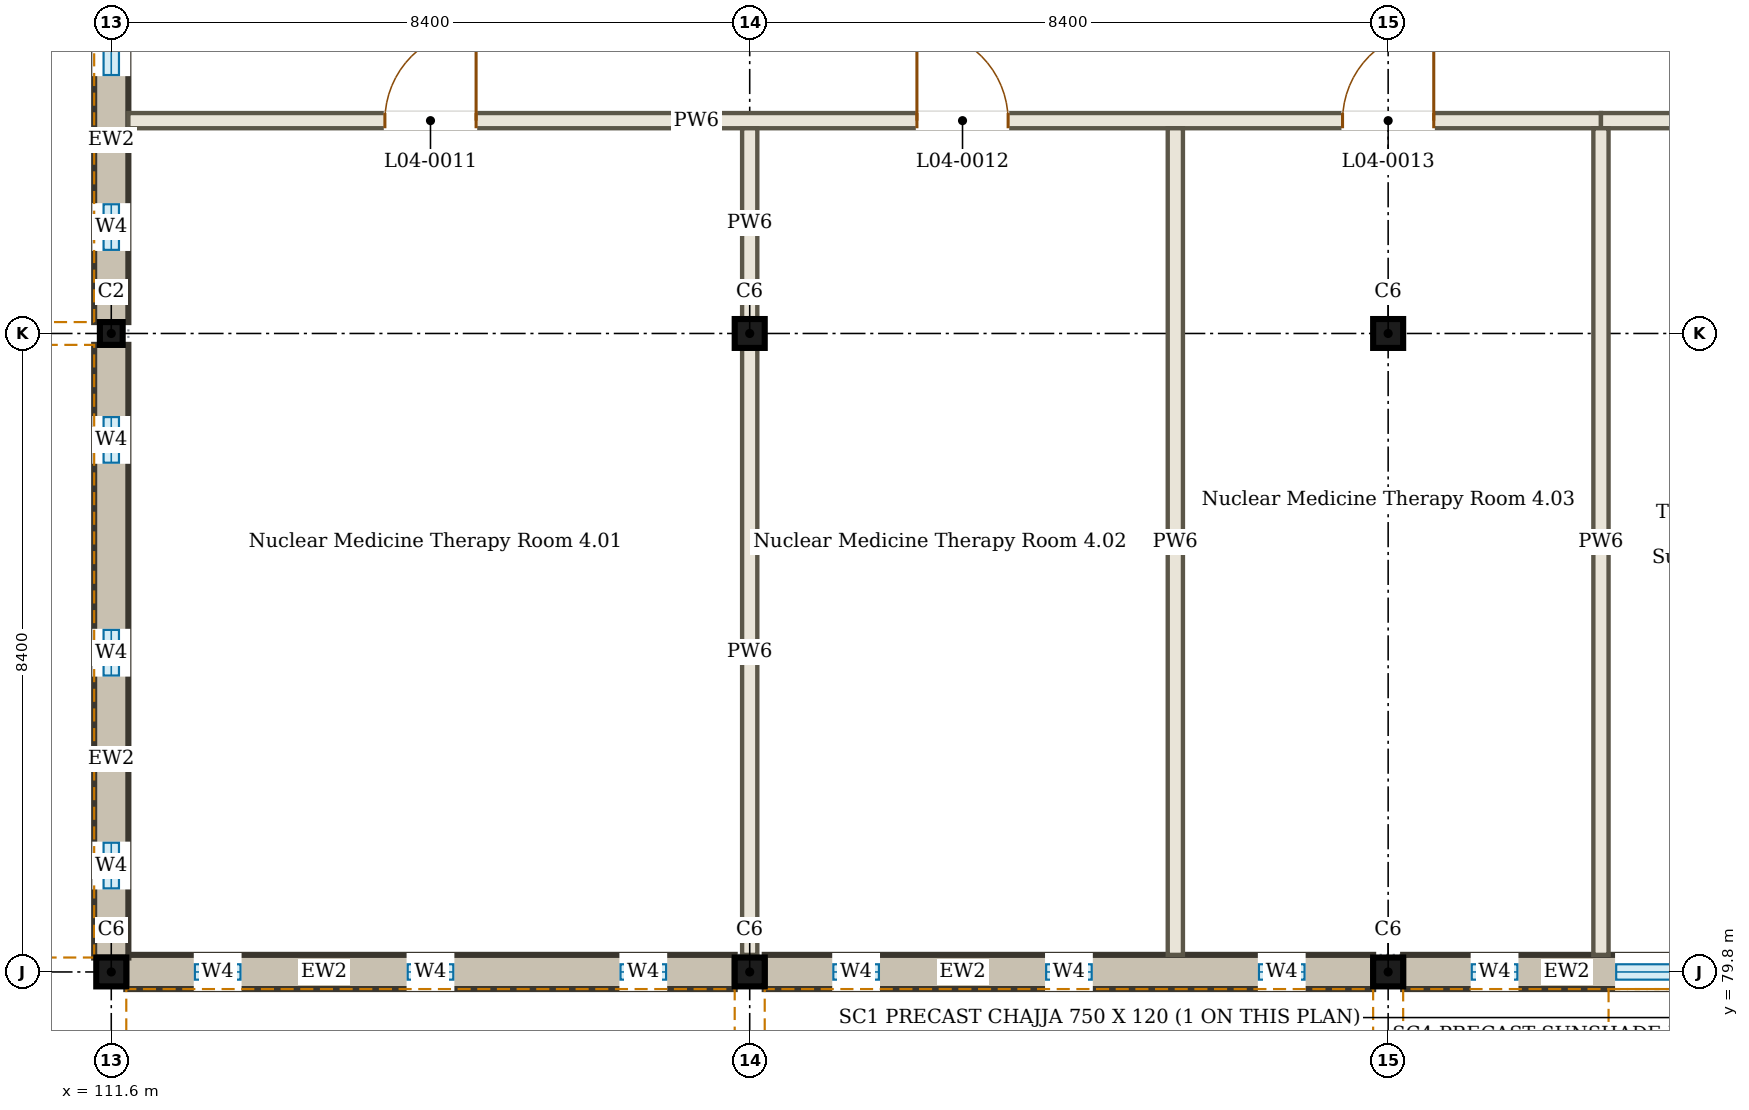
"""IFC4 building model, lengths in metres.
Left out: names, types, materials, properties, quantities, classifications, styles, units other than length and angle.
Written with IfcOpenShell. Run it as: python <this file> out.ifc"""

import sys

from ifc_helpers import new_model, si_unit, direction, frame, frame_2d, origin, origin_2d, place, context, subcontext, project, spatial, rectangle, i_section, extrude, element, fill, save


model = new_model("IFC4")
c1 = context("Model", 3, precision=1e-05, world=origin(), true_north=direction((0.0, 1.0)))
c2 = subcontext(c1, "Body", "Model", "MODEL_VIEW")
j1 = project(units=[si_unit("LENGTHUNIT", "METRE"), si_unit("PLANEANGLEUNIT", "RADIAN")], contexts=[c1])
p1 = place(None, origin())
s1 = spatial("IfcSite", under=j1, at=p1, CompositionType="ELEMENT")
p2 = place(p1, origin())
s2 = spatial("IfcBuilding", under=s1, at=p2, CompositionType="ELEMENT")
p3 = place(p2, frame((0.0, 0.0, 18.0)))
s3 = spatial("IfcBuildingStorey", under=s2, at=p3, CompositionType="ELEMENT", Elevation=18.0)
for number, where, z_axis, x_axis in (
    (1, (111.6, 79.8, 0.0), (0.0, 0.0, 1.0), (1.0, 0.0, 0.0)),
    (2, (120.0, 79.8, 0.0), (0.0, 0.0, 1.0), (1.0, 0.0, 0.0)),
    (3, (128.4, 79.8, 0.0), (0.0, 0.0, 1.0), (1.0, 0.0, 0.0)),
):
    element("IfcColumn", number, at=place(p3, frame(where, z_axis=z_axis, x_axis=x_axis)), inside=s3, PredefinedType="COLUMN", context=c2, shape_type="SweptSolid", body=[
        extrude(i_section(OverallWidth=0.395, OverallDepth=0.38, WebThickness=0.019, FlangeThickness=0.03, FilletRadius=0.027, at=origin_2d()), origin(), (0.0, 0.0, 1.0), 4.5),
    ])
p4 = place(p3, frame((111.6, 88.2, 0.0), z_axis=(0.0, 0.0, 1.0), x_axis=(1.0, 0.0, 0.0)))
e4 = element("IfcColumn", 4, at=p4, inside=s3, PredefinedType="COLUMN", context=c2, shape_type="SweptSolid", body=[
    extrude(i_section(OverallWidth=0.3, OverallDepth=0.3, WebThickness=0.011, FlangeThickness=0.019, FilletRadius=0.027, at=origin_2d()), origin(), (0.0, 0.0, 1.0), 4.5),
])
for number, where, z_axis, x_axis in (
    (5, (120.0, 88.2, 0.0), (0.0, 0.0, 1.0), (1.0, 0.0, 0.0)),
    (6, (128.4, 88.2, 0.0), (0.0, 0.0, 1.0), (1.0, 0.0, 0.0)),
):
    element("IfcColumn", number, at=place(p3, frame(where, z_axis=z_axis, x_axis=x_axis)), inside=s3, PredefinedType="COLUMN", context=c2, shape_type="SweptSolid", body=[
        extrude(i_section(OverallWidth=0.395, OverallDepth=0.38, WebThickness=0.019, FlangeThickness=0.03, FilletRadius=0.027, at=origin_2d()), origin(), (0.0, 0.0, 1.0), 4.5),
    ])
p5 = place(p3, frame((111.798, 79.8, 0.0), z_axis=(0.0, 0.0, 1.0), x_axis=(1.0, 0.0, 0.0)))
e7 = element("IfcWall", 7, at=p5, inside=s3, PredefinedType="SOLIDWALL", context=c2, shape_type="SweptSolid", body=[
    extrude(rectangle(XDim=8.005, YDim=0.45, at=frame_2d((4.002, 0.0))), origin(), (0.0, 0.0, 1.0), 3.8),
])
p6 = place(p5, frame((0.903, 0.0, 2.1)))
e8 = element("IfcOpeningElement", 8, at=p6, cuts=e7, PredefinedType="OPENING", context=c2, shape_type="SweptSolid", body=[
    extrude(rectangle(XDim=0.6, YDim=1.2, at=frame_2d((0.3, 0.6))), frame((0.0, 0.235, 0.0), z_axis=(0.0, -1.0, 0.0), x_axis=(1.0, 0.0, 0.0)), (0.0, 0.0, 1.0), 0.47),
])
p7 = place(p5, frame((3.702, 0.0, 2.1)))
e9 = element("IfcOpeningElement", 9, at=p7, cuts=e7, PredefinedType="OPENING", context=c2, shape_type="SweptSolid", body=[
    extrude(rectangle(XDim=0.6, YDim=1.2, at=frame_2d((0.3, 0.6))), frame((0.0, 0.235, 0.0), z_axis=(0.0, -1.0, 0.0), x_axis=(1.0, 0.0, 0.0)), (0.0, 0.0, 1.0), 0.47),
])
p8 = place(p5, frame((6.502, 0.0, 2.1)))
e10 = element("IfcOpeningElement", 10, at=p8, cuts=e7, PredefinedType="OPENING", context=c2, shape_type="SweptSolid", body=[
    extrude(rectangle(XDim=0.6, YDim=1.2, at=frame_2d((0.3, 0.6))), frame((0.0, 0.235, 0.0), z_axis=(0.0, -1.0, 0.0), x_axis=(1.0, 0.0, 0.0)), (0.0, 0.0, 1.0), 0.47),
])
p9 = place(p3, frame((111.798, 79.64, 3.82), z_axis=(0.0, 0.0, 1.0), x_axis=(1.0, 0.0, 0.0)))
e11 = element("IfcWall", 11, at=p9, inside=s3, PredefinedType="SOLIDWALL", context=c2, shape_type="SweptSolid", body=[
    extrude(rectangle(XDim=8.005, YDim=0.13, at=frame_2d((4.002, 0.0))), origin(), (0.0, 0.0, 1.0), 0.68),
])
p10 = place(p3, frame((120.198, 79.8, 0.0), z_axis=(0.0, 0.0, 1.0), x_axis=(1.0, 0.0, 0.0)))
e12 = element("IfcWall", 12, at=p10, inside=s3, PredefinedType="SOLIDWALL", context=c2, shape_type="SweptSolid", body=[
    extrude(rectangle(XDim=8.005, YDim=0.45, at=frame_2d((4.002, 0.0))), origin(), (0.0, 0.0, 1.0), 3.8),
])
p11 = place(p10, frame((0.903, 0.0, 2.1)))
e13 = element("IfcOpeningElement", 13, at=p11, cuts=e12, PredefinedType="OPENING", context=c2, shape_type="SweptSolid", body=[
    extrude(rectangle(XDim=0.6, YDim=1.2, at=frame_2d((0.3, 0.6))), frame((0.0, 0.235, 0.0), z_axis=(0.0, -1.0, 0.0), x_axis=(1.0, 0.0, 0.0)), (0.0, 0.0, 1.0), 0.47),
])
p12 = place(p10, frame((3.702, 0.0, 2.1)))
e14 = element("IfcOpeningElement", 14, at=p12, cuts=e12, PredefinedType="OPENING", context=c2, shape_type="SweptSolid", body=[
    extrude(rectangle(XDim=0.6, YDim=1.2, at=frame_2d((0.3, 0.6))), frame((0.0, 0.235, 0.0), z_axis=(0.0, -1.0, 0.0), x_axis=(1.0, 0.0, 0.0)), (0.0, 0.0, 1.0), 0.47),
])
p13 = place(p10, frame((6.502, 0.0, 2.1)))
e15 = element("IfcOpeningElement", 15, at=p13, cuts=e12, PredefinedType="OPENING", context=c2, shape_type="SweptSolid", body=[
    extrude(rectangle(XDim=0.6, YDim=1.2, at=frame_2d((0.3, 0.6))), frame((0.0, 0.235, 0.0), z_axis=(0.0, -1.0, 0.0), x_axis=(1.0, 0.0, 0.0)), (0.0, 0.0, 1.0), 0.47),
])
p14 = place(p3, frame((120.198, 79.64, 3.82), z_axis=(0.0, 0.0, 1.0), x_axis=(1.0, 0.0, 0.0)))
e16 = element("IfcWall", 16, at=p14, inside=s3, PredefinedType="SOLIDWALL", context=c2, shape_type="SweptSolid", body=[
    extrude(rectangle(XDim=8.005, YDim=0.13, at=frame_2d((4.002, 0.0))), origin(), (0.0, 0.0, 1.0), 0.68),
])
p15 = place(p3, frame((128.597, 79.8, 0.0), z_axis=(0.0, 0.0, 1.0), x_axis=(1.0, 0.0, 0.0)))
e17 = element("IfcWall", 17, at=p15, inside=s3, PredefinedType="SOLIDWALL", context=c2, shape_type="SweptSolid", body=[
    extrude(rectangle(XDim=8.203, YDim=0.45, at=frame_2d((4.101, 0.0))), origin(), (0.0, 0.0, 1.0), 3.8),
])
p16 = place(p15, frame((0.903, 0.0, 2.1)))
e18 = element("IfcOpeningElement", 18, at=p16, cuts=e17, PredefinedType="OPENING", context=c2, shape_type="SweptSolid", body=[
    extrude(rectangle(XDim=0.6, YDim=1.2, at=frame_2d((0.3, 0.6))), frame((0.0, 0.235, 0.0), z_axis=(0.0, -1.0, 0.0), x_axis=(1.0, 0.0, 0.0)), (0.0, 0.0, 1.0), 0.47),
])
p17 = place(p15, frame((2.802, 0.0, 0.9)))
e19 = element("IfcOpeningElement", 19, at=p17, cuts=e17, PredefinedType="OPENING", context=c2, shape_type="SweptSolid", body=[
    extrude(rectangle(XDim=2.4, YDim=1.2, at=frame_2d((1.2, 0.6))), frame((0.0, 0.235, 0.0), z_axis=(0.0, -1.0, 0.0), x_axis=(1.0, 0.0, 0.0)), (0.0, 0.0, 1.0), 0.47),
])
p18 = place(p15, frame((6.502, 0.0, 2.1)))
e20 = element("IfcOpeningElement", 20, at=p18, cuts=e17, PredefinedType="OPENING", context=c2, shape_type="SweptSolid", body=[
    extrude(rectangle(XDim=0.6, YDim=1.2, at=frame_2d((0.3, 0.6))), frame((0.0, 0.235, 0.0), z_axis=(0.0, -1.0, 0.0), x_axis=(1.0, 0.0, 0.0)), (0.0, 0.0, 1.0), 0.47),
])
p19 = place(p3, frame((128.597, 79.64, 3.82), z_axis=(0.0, 0.0, 1.0), x_axis=(1.0, 0.0, 0.0)))
e21 = element("IfcWall", 21, at=p19, inside=s3, PredefinedType="SOLIDWALL", context=c2, shape_type="SweptSolid", body=[
    extrude(rectangle(XDim=8.203, YDim=0.13, at=frame_2d((4.101, 0.0))), origin(), (0.0, 0.0, 1.0), 0.68),
])
p20 = place(p3, frame((111.6, 79.99, 0.0), z_axis=(0.0, 0.0, 1.0), x_axis=(0.0, 1.0, 0.0)))
e22 = element("IfcWall", 22, at=p20, inside=s3, PredefinedType="SOLIDWALL", context=c2, shape_type="SweptSolid", body=[
    extrude(rectangle(XDim=8.06, YDim=0.45, at=frame_2d((4.03, 0.0))), origin(), (0.0, 0.0, 1.0), 3.8),
])
p21 = place(p20, frame((0.91, 0.0, 2.1)))
e23 = element("IfcOpeningElement", 23, at=p21, cuts=e22, PredefinedType="OPENING", context=c2, shape_type="SweptSolid", body=[
    extrude(rectangle(XDim=0.6, YDim=1.2, at=frame_2d((0.3, 0.6))), frame((0.0, 0.235, 0.0), z_axis=(0.0, -1.0, 0.0), x_axis=(1.0, 0.0, 0.0)), (0.0, 0.0, 1.0), 0.47),
])
p22 = place(p20, frame((3.71, 0.0, 2.1)))
e24 = element("IfcOpeningElement", 24, at=p22, cuts=e22, PredefinedType="OPENING", context=c2, shape_type="SweptSolid", body=[
    extrude(rectangle(XDim=0.6, YDim=1.2, at=frame_2d((0.3, 0.6))), frame((0.0, 0.235, 0.0), z_axis=(0.0, -1.0, 0.0), x_axis=(1.0, 0.0, 0.0)), (0.0, 0.0, 1.0), 0.47),
])
p23 = place(p20, frame((6.51, 0.0, 2.1)))
e25 = element("IfcOpeningElement", 25, at=p23, cuts=e22, PredefinedType="OPENING", context=c2, shape_type="SweptSolid", body=[
    extrude(rectangle(XDim=0.6, YDim=1.2, at=frame_2d((0.3, 0.6))), frame((0.0, 0.235, 0.0), z_axis=(0.0, -1.0, 0.0), x_axis=(1.0, 0.0, 0.0)), (0.0, 0.0, 1.0), 0.47),
])
p24 = place(p3, frame((111.44, 79.99, 3.82), z_axis=(0.0, 0.0, 1.0), x_axis=(0.0, 1.0, 0.0)))
e26 = element("IfcWall", 26, at=p24, inside=s3, PredefinedType="SOLIDWALL", context=c2, shape_type="SweptSolid", body=[
    extrude(rectangle(XDim=8.06, YDim=0.13, at=frame_2d((4.03, 0.0))), origin(), (0.0, 0.0, 1.0), 0.68),
])
p25 = place(p3, frame((111.6, 88.35, 0.0), z_axis=(0.0, 0.0, 1.0), x_axis=(0.0, 1.0, 0.0)))
e27 = element("IfcWall", 27, at=p25, inside=s3, PredefinedType="SOLIDWALL", context=c2, shape_type="SweptSolid", body=[
    extrude(rectangle(XDim=8.25, YDim=0.45, at=frame_2d((4.125, 0.0))), origin(), (0.0, 0.0, 1.0), 3.8),
])
p26 = place(p25, frame((0.95, 0.0, 2.1)))
e28 = element("IfcOpeningElement", 28, at=p26, cuts=e27, PredefinedType="OPENING", context=c2, shape_type="SweptSolid", body=[
    extrude(rectangle(XDim=0.6, YDim=1.2, at=frame_2d((0.3, 0.6))), frame((0.0, 0.235, 0.0), z_axis=(0.0, -1.0, 0.0), x_axis=(1.0, 0.0, 0.0)), (0.0, 0.0, 1.0), 0.47),
])
p27 = place(p25, frame((3.25, 0.0, 2.7)))
e29 = element("IfcOpeningElement", 29, at=p27, cuts=e27, PredefinedType="OPENING", context=c2, shape_type="SweptSolid", body=[
    extrude(rectangle(XDim=1.6, YDim=0.6, at=frame_2d((0.8, 0.3))), frame((0.0, 0.235, 0.0), z_axis=(0.0, -1.0, 0.0), x_axis=(1.0, 0.0, 0.0)), (0.0, 0.0, 1.0), 0.47),
])
p28 = place(p25, frame((6.05, 0.0, 2.7)))
e30 = element("IfcOpeningElement", 30, at=p28, cuts=e27, PredefinedType="OPENING", context=c2, shape_type="SweptSolid", body=[
    extrude(rectangle(XDim=1.6, YDim=0.6, at=frame_2d((0.8, 0.3))), frame((0.0, 0.235, 0.0), z_axis=(0.0, -1.0, 0.0), x_axis=(1.0, 0.0, 0.0)), (0.0, 0.0, 1.0), 0.47),
])
p29 = place(p3, frame((111.44, 88.35, 3.82), z_axis=(0.0, 0.0, 1.0), x_axis=(0.0, 1.0, 0.0)))
e31 = element("IfcWall", 31, at=p29, inside=s3, PredefinedType="SOLIDWALL", context=c2, shape_type="SweptSolid", body=[
    extrude(rectangle(XDim=8.25, YDim=0.13, at=frame_2d((4.125, 0.0))), origin(), (0.0, 0.0, 1.0), 0.68),
])
p30 = place(p3, frame((111.825, 91.0, 0.0), z_axis=(0.0, 0.0, 1.0), x_axis=(1.0, 0.0, 0.0)))
e32 = element("IfcWall", 32, at=p30, inside=s3, PredefinedType="PARTITIONING", context=c2, shape_type="SweptSolid", body=[
    extrude(rectangle(XDim=19.375, YDim=0.2, at=frame_2d((9.688, 0.0))), origin(), (0.0, 0.0, 1.0), 3.75),
])
p31 = place(p30, frame((3.375, 0.0, 0.0)))
e33 = element("IfcOpeningElement", 33, at=p31, cuts=e32, PredefinedType="OPENING", context=c2, shape_type="SweptSolid", body=[
    extrude(rectangle(XDim=1.2, YDim=2.1, at=frame_2d((0.6, 1.05))), frame((0.0, 0.11, 0.0), z_axis=(0.0, -1.0, 0.0), x_axis=(1.0, 0.0, 0.0)), (0.0, 0.0, 1.0), 0.22),
])
p32 = place(p30, frame((10.375, 0.0, 0.0)))
e34 = element("IfcOpeningElement", 34, at=p32, cuts=e32, PredefinedType="OPENING", context=c2, shape_type="SweptSolid", body=[
    extrude(rectangle(XDim=1.2, YDim=2.1, at=frame_2d((0.6, 1.05))), frame((0.0, 0.11, 0.0), z_axis=(0.0, -1.0, 0.0), x_axis=(1.0, 0.0, 0.0)), (0.0, 0.0, 1.0), 0.22),
])
p33 = place(p30, frame((15.975, 0.0, 0.0)))
e35 = element("IfcOpeningElement", 35, at=p33, cuts=e32, PredefinedType="OPENING", context=c2, shape_type="SweptSolid", body=[
    extrude(rectangle(XDim=1.2, YDim=2.1, at=frame_2d((0.6, 1.05))), frame((0.0, 0.11, 0.0), z_axis=(0.0, -1.0, 0.0), x_axis=(1.0, 0.0, 0.0)), (0.0, 0.0, 1.0), 0.22),
])
p34 = place(p3, frame((131.2, 91.0, 0.0), z_axis=(0.0, 0.0, 1.0), x_axis=(1.0, 0.0, 0.0)))
e36 = element("IfcWall", 36, at=p34, inside=s3, PredefinedType="PARTITIONING", context=c2, shape_type="SweptSolid", body=[
    extrude(rectangle(XDim=2.9, YDim=0.2, at=frame_2d((1.45, 0.0))), origin(), (0.0, 0.0, 1.0), 3.894),
])
p35 = place(p3, frame((120.0, 80.025, 0.0), z_axis=(0.0, 0.0, 1.0), x_axis=(0.0, 1.0, 0.0)))
e37 = element("IfcWall", 37, at=p35, inside=s3, PredefinedType="PARTITIONING", context=c2, shape_type="SweptSolid", body=[
    extrude(rectangle(XDim=7.978, YDim=0.2, at=frame_2d((3.989, 0.0))), origin(), (0.0, 0.0, 1.0), 3.75),
])
p36 = place(p3, frame((120.0, 88.397, 0.0), z_axis=(0.0, 0.0, 1.0), x_axis=(0.0, 1.0, 0.0)))
e38 = element("IfcWall", 38, at=p36, inside=s3, PredefinedType="PARTITIONING", context=c2, shape_type="SweptSolid", body=[
    extrude(rectangle(XDim=2.502, YDim=0.2, at=frame_2d((1.251, 0.0))), origin(), (0.0, 0.0, 1.0), 3.75),
])
for number, where, z_axis, x_axis in (
    (39, (125.6, 80.025, 0.0), (0.0, 0.0, 1.0), (0.0, 1.0, 0.0)),
    (40, (131.2, 80.025, 0.0), (0.0, 0.0, 1.0), (0.0, 1.0, 0.0)),
):
    element("IfcWall", number, at=place(p3, frame(where, z_axis=z_axis, x_axis=x_axis)), inside=s3, PredefinedType="PARTITIONING", context=c2, shape_type="SweptSolid", body=[
        extrude(rectangle(XDim=10.875, YDim=0.2, at=frame_2d((5.438, 0.0))), origin(), (0.0, 0.0, 1.0), 3.75),
    ])
p37 = place(p6, origin())
e41 = element("IfcWindow", 41, at=p37, inside=s3, PartitioningType="SINGLE_PANEL", PredefinedType="WINDOW", context=c2, shape_type="SweptSolid", body=[
    extrude(rectangle(XDim=0.6, YDim=1.2, at=frame_2d((0.3, 0.6))), frame((0.0, 0.135, 0.0), z_axis=(0.0, -1.0, 0.0), x_axis=(1.0, 0.0, 0.0)), (0.0, 0.0, 1.0), 0.06),
])
fill(e8, e41)
p38 = place(p7, origin())
e42 = element("IfcWindow", 42, at=p38, inside=s3, PartitioningType="SINGLE_PANEL", PredefinedType="WINDOW", context=c2, shape_type="SweptSolid", body=[
    extrude(rectangle(XDim=0.6, YDim=1.2, at=frame_2d((0.3, 0.6))), frame((0.0, 0.135, 0.0), z_axis=(0.0, -1.0, 0.0), x_axis=(1.0, 0.0, 0.0)), (0.0, 0.0, 1.0), 0.06),
])
fill(e9, e42)
p39 = place(p8, origin())
e43 = element("IfcWindow", 43, at=p39, inside=s3, PartitioningType="SINGLE_PANEL", PredefinedType="WINDOW", context=c2, shape_type="SweptSolid", body=[
    extrude(rectangle(XDim=0.6, YDim=1.2, at=frame_2d((0.3, 0.6))), frame((0.0, 0.135, 0.0), z_axis=(0.0, -1.0, 0.0), x_axis=(1.0, 0.0, 0.0)), (0.0, 0.0, 1.0), 0.06),
])
fill(e10, e43)
p40 = place(p11, origin())
e44 = element("IfcWindow", 44, at=p40, inside=s3, PartitioningType="SINGLE_PANEL", PredefinedType="WINDOW", context=c2, shape_type="SweptSolid", body=[
    extrude(rectangle(XDim=0.6, YDim=1.2, at=frame_2d((0.3, 0.6))), frame((0.0, 0.135, 0.0), z_axis=(0.0, -1.0, 0.0), x_axis=(1.0, 0.0, 0.0)), (0.0, 0.0, 1.0), 0.06),
])
fill(e13, e44)
p41 = place(p12, origin())
e45 = element("IfcWindow", 45, at=p41, inside=s3, PartitioningType="SINGLE_PANEL", PredefinedType="WINDOW", context=c2, shape_type="SweptSolid", body=[
    extrude(rectangle(XDim=0.6, YDim=1.2, at=frame_2d((0.3, 0.6))), frame((0.0, 0.135, 0.0), z_axis=(0.0, -1.0, 0.0), x_axis=(1.0, 0.0, 0.0)), (0.0, 0.0, 1.0), 0.06),
])
fill(e14, e45)
p42 = place(p13, origin())
e46 = element("IfcWindow", 46, at=p42, inside=s3, PartitioningType="SINGLE_PANEL", PredefinedType="WINDOW", context=c2, shape_type="SweptSolid", body=[
    extrude(rectangle(XDim=0.6, YDim=1.2, at=frame_2d((0.3, 0.6))), frame((0.0, 0.135, 0.0), z_axis=(0.0, -1.0, 0.0), x_axis=(1.0, 0.0, 0.0)), (0.0, 0.0, 1.0), 0.06),
])
fill(e15, e46)
p43 = place(p16, origin())
e47 = element("IfcWindow", 47, at=p43, inside=s3, PartitioningType="SINGLE_PANEL", PredefinedType="WINDOW", context=c2, shape_type="SweptSolid", body=[
    extrude(rectangle(XDim=0.6, YDim=1.2, at=frame_2d((0.3, 0.6))), frame((0.0, 0.135, 0.0), z_axis=(0.0, -1.0, 0.0), x_axis=(1.0, 0.0, 0.0)), (0.0, 0.0, 1.0), 0.06),
])
fill(e18, e47)
p44 = place(p17, origin())
e48 = element("IfcWindow", 48, at=p44, inside=s3, PartitioningType="SINGLE_PANEL", PredefinedType="WINDOW", context=c2, shape_type="SweptSolid", body=[
    extrude(rectangle(XDim=2.4, YDim=1.2, at=frame_2d((1.2, 0.6))), frame((0.0, 0.03, 0.0), z_axis=(0.0, -1.0, 0.0), x_axis=(1.0, 0.0, 0.0)), (0.0, 0.0, 1.0), 0.06),
])
fill(e19, e48)
p45 = place(p21, origin())
e49 = element("IfcWindow", 49, at=p45, inside=s3, PartitioningType="SINGLE_PANEL", PredefinedType="WINDOW", context=c2, shape_type="SweptSolid", body=[
    extrude(rectangle(XDim=0.6, YDim=1.2, at=frame_2d((0.3, 0.6))), frame((0.0, -0.075, 0.0), z_axis=(0.0, -1.0, 0.0), x_axis=(1.0, 0.0, 0.0)), (0.0, 0.0, 1.0), 0.06),
])
fill(e23, e49)
p46 = place(p22, origin())
e50 = element("IfcWindow", 50, at=p46, inside=s3, PartitioningType="SINGLE_PANEL", PredefinedType="WINDOW", context=c2, shape_type="SweptSolid", body=[
    extrude(rectangle(XDim=0.6, YDim=1.2, at=frame_2d((0.3, 0.6))), frame((0.0, -0.075, 0.0), z_axis=(0.0, -1.0, 0.0), x_axis=(1.0, 0.0, 0.0)), (0.0, 0.0, 1.0), 0.06),
])
fill(e24, e50)
p47 = place(p23, origin())
e51 = element("IfcWindow", 51, at=p47, inside=s3, PartitioningType="SINGLE_PANEL", PredefinedType="WINDOW", context=c2, shape_type="SweptSolid", body=[
    extrude(rectangle(XDim=0.6, YDim=1.2, at=frame_2d((0.3, 0.6))), frame((0.0, -0.075, 0.0), z_axis=(0.0, -1.0, 0.0), x_axis=(1.0, 0.0, 0.0)), (0.0, 0.0, 1.0), 0.06),
])
fill(e25, e51)
p48 = place(p26, origin())
e52 = element("IfcWindow", 52, at=p48, inside=s3, PartitioningType="SINGLE_PANEL", PredefinedType="WINDOW", context=c2, shape_type="SweptSolid", body=[
    extrude(rectangle(XDim=0.6, YDim=1.2, at=frame_2d((0.3, 0.6))), frame((0.0, -0.075, 0.0), z_axis=(0.0, -1.0, 0.0), x_axis=(1.0, 0.0, 0.0)), (0.0, 0.0, 1.0), 0.06),
])
fill(e28, e52)
p49 = place(p27, origin())
e53 = element("IfcWindow", 53, at=p49, inside=s3, PartitioningType="SINGLE_PANEL", PredefinedType="WINDOW", context=c2, shape_type="SweptSolid", body=[
    extrude(rectangle(XDim=1.6, YDim=0.6, at=frame_2d((0.8, 0.3))), frame((0.0, 0.03, 0.0), z_axis=(0.0, -1.0, 0.0), x_axis=(1.0, 0.0, 0.0)), (0.0, 0.0, 1.0), 0.06),
])
fill(e29, e53)
p50 = place(p31, origin())
e54 = element("IfcDoor", 54, at=p50, inside=s3, OperationType="SINGLE_SWING_RIGHT", PredefinedType="DOOR", context=c2, shape_type="SweptSolid", body=[
    extrude(rectangle(XDim=1.2, YDim=2.1, at=frame_2d((0.6, 1.05))), frame((0.0, 0.025, 0.0), z_axis=(0.0, -1.0, 0.0), x_axis=(1.0, 0.0, 0.0)), (0.0, 0.0, 1.0), 0.05),
])
fill(e33, e54)
p51 = place(p32, origin())
e55 = element("IfcDoor", 55, at=p51, inside=s3, OperationType="SINGLE_SWING_LEFT", PredefinedType="DOOR", context=c2, shape_type="SweptSolid", body=[
    extrude(rectangle(XDim=1.2, YDim=2.1, at=frame_2d((0.6, 1.05))), frame((0.0, 0.025, 0.0), z_axis=(0.0, -1.0, 0.0), x_axis=(1.0, 0.0, 0.0)), (0.0, 0.0, 1.0), 0.05),
])
fill(e34, e55)
p52 = place(p33, origin())
e56 = element("IfcDoor", 56, at=p52, inside=s3, OperationType="SINGLE_SWING_RIGHT", PredefinedType="DOOR", context=c2, shape_type="SweptSolid", body=[
    extrude(rectangle(XDim=1.2, YDim=2.1, at=frame_2d((0.6, 1.05))), frame((0.0, 0.025, 0.0), z_axis=(0.0, -1.0, 0.0), x_axis=(1.0, 0.0, 0.0)), (0.0, 0.0, 1.0), 0.05),
])
fill(e35, e56)
save(model, sys.argv[1])
